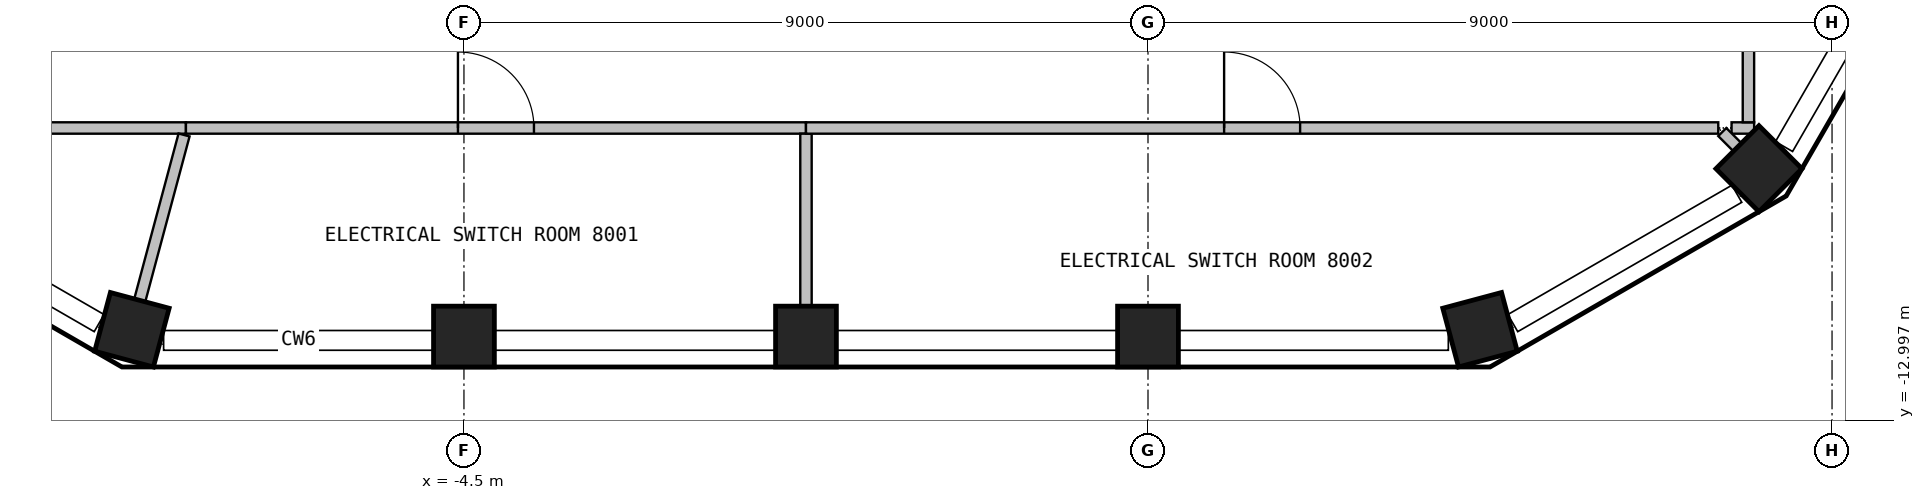
"""IFC4 building model, lengths in metres.
Left out: names, types, materials, properties, quantities, classifications, styles, units other than length and angle.
Written with IfcOpenShell. Run it as: python <this file> out.ifc"""

import sys

from ifc_helpers import new_model, si_unit, direction, frame, frame_2d, origin, origin_2d, place, context, subcontext, project, spatial, rectangle, extrude, element, fill, save


model = new_model("IFC4")
c1 = context("Model", 3, precision=1e-05, world=origin(), true_north=direction((0.0, 1.0)))
c2 = subcontext(c1, "Body", "Model", "MODEL_VIEW")
j1 = project(units=[si_unit("LENGTHUNIT", "METRE"), si_unit("PLANEANGLEUNIT", "RADIAN")], contexts=[c1])
p1 = place(None, origin())
s1 = spatial("IfcSite", under=j1, at=p1, CompositionType="ELEMENT")
p2 = place(p1, origin())
s2 = spatial("IfcBuilding", under=s1, at=p2, CompositionType="ELEMENT")
p3 = place(p2, frame((0.0, 0.0, 327.9)))
s3 = spatial("IfcBuildingStorey", under=s2, at=p3, CompositionType="ELEMENT", Elevation=327.9)
for number, where, z_axis, x_axis in (
    (1, (-8.869, -11.804, 0.0), (0.0, 0.0, 1.0), (0.966, -0.259, 0.0)),
    (2, (-4.5, -11.894, 0.0), (0.0, 0.0, 1.0), (1.0, 0.0, 0.0)),
    (3, (0.0, -11.894, 0.0), (0.0, 0.0, 1.0), (1.0, 0.0, 0.0)),
    (4, (4.5, -11.894, 0.0), (0.0, 0.0, 1.0), (1.0, 0.0, 0.0)),
    (5, (8.869, -11.804, 0.0), (0.0, 0.0, 1.0), (0.966, 0.259, 0.0)),
    (6, (12.539, -9.686, 0.0), (0.0, 0.0, 1.0), (0.707, 0.707, 0.0)),
):
    element("IfcColumn", number, at=place(p3, frame(where, z_axis=z_axis, x_axis=x_axis)), inside=s3, PredefinedType="COLUMN", context=c2, shape_type="SweptSolid", body=[
        extrude(rectangle(XDim=0.8, YDim=0.8, at=origin_2d()), origin(), (0.0, 0.0, 1.0), 3.6),
    ])
p4 = place(p3, frame((-12.325, -9.15, 0.0), z_axis=(0.0, 0.0, 1.0), x_axis=(1.0, 0.0, 0.0)))
e7 = element("IfcWall", 7, at=p4, inside=s3, PredefinedType="PARTITIONING", context=c2, shape_type="SweptSolid", body=[
    extrude(rectangle(XDim=4.167, YDim=0.15, at=frame_2d((2.083, 0.0))), origin(), (0.0, 0.0, 1.0), 3.6),
])
p5 = place(p3, frame((-8.183, -9.242, 0.0), z_axis=(0.0, 0.0, 1.0), x_axis=(-0.258771776933, -0.965938490517, 0.0)))
e8 = element("IfcWall", 8, at=p5, inside=s3, PredefinedType="PARTITIONING", context=c2, shape_type="SweptSolid", body=[
    extrude(rectangle(XDim=2.849, YDim=0.15, at=frame_2d((1.425, 0.0))), origin(), (0.0, 0.0, 1.0), 3.6),
])
p6 = place(p3, frame((-8.158, -9.15, 0.0), z_axis=(0.0, 0.0, 1.0), x_axis=(1.0, 0.0, 0.0)))
e9 = element("IfcWall", 9, at=p6, inside=s3, PredefinedType="PARTITIONING", context=c2, shape_type="SweptSolid", body=[
    extrude(rectangle(XDim=8.158, YDim=0.15, at=frame_2d((4.079, 0.0))), origin(), (0.0, 0.0, 1.0), 3.6),
])
p7 = place(p6, frame((3.579, 0.0, 0.0)))
e10 = element("IfcOpeningElement", 10, at=p7, cuts=e9, PredefinedType="OPENING", context=c2, shape_type="SweptSolid", body=[
    extrude(rectangle(XDim=1.0, YDim=2.1, at=frame_2d((0.5, 1.05))), frame((0.0, 0.085, 0.0), z_axis=(0.0, -1.0, 0.0), x_axis=(1.0, 0.0, 0.0)), (0.0, 0.0, 1.0), 0.17),
])
p8 = place(p3, frame((0.0, -9.225, 0.0), z_axis=(0.0, 0.0, 1.0), x_axis=(0.0, -1.0, 0.0)))
e11 = element("IfcWall", 11, at=p8, inside=s3, PredefinedType="PARTITIONING", context=c2, shape_type="SweptSolid", body=[
    extrude(rectangle(XDim=2.769, YDim=0.15, at=frame_2d((1.384, 0.0))), origin(), (0.0, 0.0, 1.0), 3.6),
])
p9 = place(p3, frame((0.0, -9.15, 0.0), z_axis=(0.0, 0.0, 1.0), x_axis=(1.0, 0.0, 0.0)))
e12 = element("IfcWall", 12, at=p9, inside=s3, PredefinedType="PARTITIONING", context=c2, shape_type="SweptSolid", body=[
    extrude(rectangle(XDim=12.003, YDim=0.15, at=frame_2d((6.001, 0.0))), origin(), (0.0, 0.0, 1.0), 3.6),
])
p10 = place(p9, frame((5.501, 0.0, 0.0)))
e13 = element("IfcOpeningElement", 13, at=p10, cuts=e12, PredefinedType="OPENING", context=c2, shape_type="SweptSolid", body=[
    extrude(rectangle(XDim=1.0, YDim=2.1, at=frame_2d((0.5, 1.05))), frame((0.0, 0.085, 0.0), z_axis=(0.0, -1.0, 0.0), x_axis=(1.0, 0.0, 0.0)), (0.0, 0.0, 1.0), 0.17),
])
p11 = place(p3, frame((12.178, -9.15, 0.0), z_axis=(0.0, 0.0, 1.0), x_axis=(1.0, 0.0, 0.0)))
e14 = element("IfcWall", 14, at=p11, inside=s3, PredefinedType="PARTITIONING", context=c2, shape_type="SweptSolid", body=[
    extrude(rectangle(XDim=0.297, YDim=0.15, at=frame_2d((0.148, 0.0))), origin(), (0.0, 0.0, 1.0), 3.6),
])
p12 = place(p3, frame((12.056, -9.203, 0.0), z_axis=(0.0, 0.0, 1.0), x_axis=(0.706689978005, -0.707523338828, 0.0)))
e15 = element("IfcWall", 15, at=p12, inside=s3, PredefinedType="PARTITIONING", context=c2, shape_type="SweptSolid", body=[
    extrude(rectangle(XDim=0.879, YDim=0.15, at=frame_2d((0.439, 0.0))), origin(), (0.0, 0.0, 1.0), 3.6),
])
p13 = place(p3, frame((12.4, -9.075, 0.0), z_axis=(0.0, 0.0, 1.0), x_axis=(0.0, 1.0, 0.0)))
e16 = element("IfcWall", 16, at=p13, inside=s3, PredefinedType="PARTITIONING", context=c2, shape_type="SweptSolid", body=[
    extrude(rectangle(XDim=9.986, YDim=0.15, at=frame_2d((4.993, 0.0))), origin(), (0.0, 0.0, 1.0), 3.6),
])
p14 = place(p13, frame((4.493, 0.0, 0.0)))
e17 = element("IfcOpeningElement", 17, at=p14, cuts=e16, PredefinedType="OPENING", context=c2, shape_type="SweptSolid", body=[
    extrude(rectangle(XDim=1.0, YDim=2.1, at=frame_2d((0.5, 1.05))), frame((0.0, 0.085, 0.0), z_axis=(0.0, -1.0, 0.0), x_axis=(1.0, 0.0, 0.0)), (0.0, 0.0, 1.0), 0.17),
])
p15 = place(p7, origin())
e18 = element("IfcDoor", 18, at=p15, inside=s3, OperationType="SINGLE_SWING_RIGHT", PredefinedType="DOOR", context=c2, shape_type="SweptSolid", body=[
    extrude(rectangle(XDim=1.0, YDim=2.1, at=frame_2d((0.5, 1.05))), frame((0.0, 0.025, 0.0), z_axis=(0.0, -1.0, 0.0), x_axis=(1.0, 0.0, 0.0)), (0.0, 0.0, 1.0), 0.05),
])
fill(e10, e18)
p16 = place(p10, origin())
e19 = element("IfcDoor", 19, at=p16, inside=s3, OperationType="SINGLE_SWING_RIGHT", PredefinedType="DOOR", context=c2, shape_type="SweptSolid", body=[
    extrude(rectangle(XDim=1.0, YDim=2.1, at=frame_2d((0.5, 1.05))), frame((0.0, 0.025, 0.0), z_axis=(0.0, -1.0, 0.0), x_axis=(1.0, 0.0, 0.0)), (0.0, 0.0, 1.0), 0.05),
])
fill(e13, e19)
save(model, sys.argv[1])
